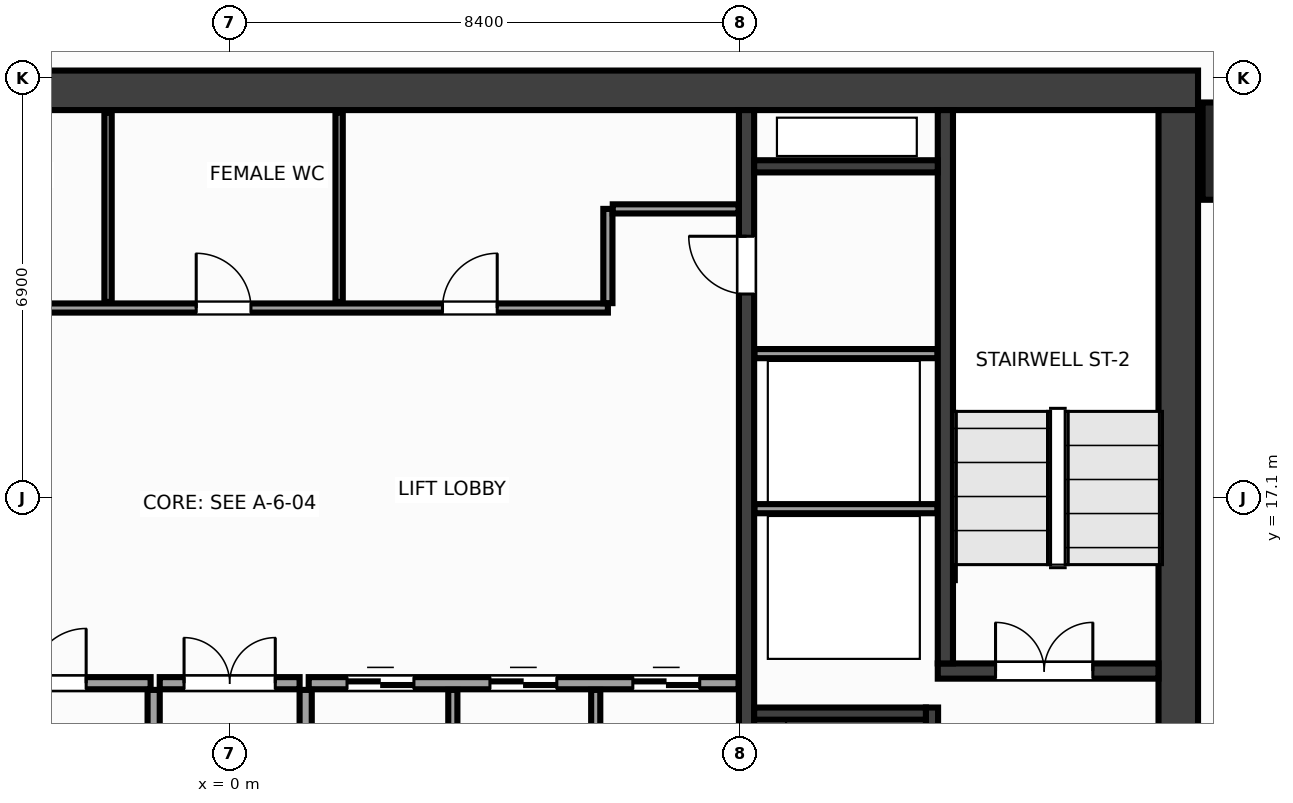
"""IFC4 building model, lengths in metres.
Left out: names, types, materials, properties, quantities, classifications, styles, units other than length and angle.
Written with IfcOpenShell. Run it as: python <this file> out.ifc"""

import sys

from ifc_helpers import new_model, si_unit, direction, frame, frame_2d, origin, origin_2d, place, context, subcontext, project, spatial, rectangle, extrude, source, transform, mapped, element, fill, save


model = new_model("IFC4")
c1 = context("Model", 3, precision=1e-05, world=origin(), true_north=direction((0.0, 1.0)))
c2 = subcontext(c1, "Body", "Model", "MODEL_VIEW")
j1 = project(units=[si_unit("LENGTHUNIT", "METRE"), si_unit("PLANEANGLEUNIT", "RADIAN")], contexts=[c1])
p1 = place(None, origin())
s1 = spatial("IfcSite", under=j1, at=p1, CompositionType="ELEMENT")
p2 = place(p1, origin())
s2 = spatial("IfcBuilding", under=s1, at=p2, CompositionType="ELEMENT")
p3 = place(p2, frame((0.0, 0.0, 113.6)))
s3 = spatial("IfcBuildingStorey", under=s2, at=p3, CompositionType="ELEMENT", Elevation=113.6)
m1 = source(origin(), c2, "Body", "SweptSolid", [
    extrude(rectangle(XDim=31.85, YDim=0.65, at=frame_2d((15.925, 0.0))), origin(), (0.0, 0.0, 1.0), 3.6),
])
p4 = place(p3, frame((-15.925, 23.8, 0.0), z_axis=(0.0, 0.0, 1.0), x_axis=(1.0, 0.0, 0.0)))
e1 = element("IfcWall", 1, at=p4, inside=s3, PredefinedType="SHEAR", context=c2, shape_type="MappedRepresentation", body=[
    mapped(m1, transform((0.0, 0.0, 0.0), x_axis=(1.0, 0.0, 0.0), y_axis=(0.0, 1.0, 0.0), z_axis=(0.0, 0.0, 1.0), scale=1.0)),
])
m2 = source(origin(), c2, "Body", "SweptSolid", [
    extrude(rectangle(XDim=12.95, YDim=0.65, at=frame_2d((6.475, 0.0))), origin(), (0.0, 0.0, 1.0), 3.6),
])
p5 = place(p3, frame((15.6, 10.525, 0.0), z_axis=(0.0, 0.0, 1.0), x_axis=(0.0, 1.0, 0.0)))
e2 = element("IfcWall", 2, at=p5, inside=s3, PredefinedType="SHEAR", context=c2, shape_type="MappedRepresentation", body=[
    mapped(m2, transform((0.0, 0.0, 0.0), x_axis=(1.0, 0.0, 0.0), y_axis=(0.0, 1.0, 0.0), z_axis=(0.0, 0.0, 1.0), scale=1.0)),
])
m3 = source(origin(), c2, "Body", "SweptSolid", [
    extrude(rectangle(XDim=12.95, YDim=0.25, at=frame_2d((6.475, 0.0))), origin(), (0.0, 0.0, 1.0), 3.6),
])
p6 = place(p3, frame((8.5, 10.525, 0.0), z_axis=(0.0, 0.0, 1.0), x_axis=(0.0, 1.0, 0.0)))
e3 = element("IfcWall", 3, at=p6, inside=s3, PredefinedType="SHEAR", context=c2, shape_type="MappedRepresentation", body=[
    mapped(m3, transform((0.0, 0.0, 0.0), x_axis=(1.0, 0.0, 0.0), y_axis=(0.0, 1.0, 0.0), z_axis=(0.0, 0.0, 1.0), scale=1.0)),
])
p7 = place(p6, frame((9.925, 0.0, 0.0)))
e4 = element("IfcOpeningElement", 4, at=p7, cuts=e3, PredefinedType="OPENING", context=c2, shape_type="SweptSolid", body=[
    extrude(rectangle(XDim=0.95, YDim=2.15, at=frame_2d((0.475, 1.075))), frame((0.0, 0.137, 0.0), z_axis=(0.0, -1.0, 0.0), x_axis=(1.0, 0.0, 0.0)), (0.0, 0.0, 1.0), 0.274),
])
m4 = source(origin(), c2, "Body", "SweptSolid", [
    extrude(rectangle(XDim=3.63, YDim=0.25, at=frame_2d((1.815, 0.0))), origin(), (0.0, 0.0, 1.0), 3.6),
])
p8 = place(p3, frame((11.645, 14.25, 0.0), z_axis=(0.0, 0.0, 1.0), x_axis=(1.0, 0.0, 0.0)))
e5 = element("IfcWall", 5, at=p8, inside=s3, PredefinedType="SHEAR", context=c2, shape_type="MappedRepresentation", body=[
    mapped(m4, transform((0.0, 0.0, 0.0), x_axis=(1.0, 0.0, 0.0), y_axis=(0.0, 1.0, 0.0), z_axis=(0.0, 0.0, 1.0), scale=1.0)),
])
p9 = place(p8, frame((0.95, 0.0, 0.0)))
e6 = element("IfcOpeningElement", 6, at=p9, cuts=e5, PredefinedType="OPENING", context=c2, shape_type="SweptSolid", body=[
    extrude(rectangle(XDim=1.6, YDim=2.15, at=frame_2d((0.8, 1.075))), frame((0.0, 0.137, 0.0), z_axis=(0.0, -1.0, 0.0), x_axis=(1.0, 0.0, 0.0)), (0.0, 0.0, 1.0), 0.274),
])
m5 = source(origin(), c2, "Body", "SweptSolid", [
    extrude(rectangle(XDim=9.1, YDim=0.25, at=frame_2d((4.55, 0.0))), origin(), (0.0, 0.0, 1.0), 3.6),
])
p10 = place(p3, frame((11.77, 14.375, 0.0), z_axis=(0.0, 0.0, 1.0), x_axis=(0.0, 1.0, 0.0)))
e7 = element("IfcWall", 7, at=p10, inside=s3, PredefinedType="SHEAR", context=c2, shape_type="MappedRepresentation", body=[
    mapped(m5, transform((0.0, 0.0, 0.0), x_axis=(1.0, 0.0, 0.0), y_axis=(0.0, 1.0, 0.0), z_axis=(0.0, 0.0, 1.0), scale=1.0)),
])
m6 = source(origin(), c2, "Body", "SweptSolid", [
    extrude(rectangle(XDim=3.125, YDim=0.2, at=frame_2d((1.562, 0.0))), origin(), (0.0, 0.0, 1.0), 3.6),
])
p11 = place(p3, frame((11.55, 10.525, 0.0), z_axis=(0.0, 0.0, 1.0), x_axis=(0.0, 1.0, 0.0)))
e8 = element("IfcWall", 8, at=p11, inside=s3, PredefinedType="SHEAR", context=c2, shape_type="MappedRepresentation", body=[
    mapped(m6, transform((0.0, 0.0, 0.0), x_axis=(1.0, 0.0, 0.0), y_axis=(0.0, 1.0, 0.0), z_axis=(0.0, 0.0, 1.0), scale=1.0)),
])
p12 = place(p11, frame((0.9, 0.0, 0.0)))
e9 = element("IfcOpeningElement", 9, at=p12, cuts=e8, PredefinedType="OPENING", context=c2, shape_type="SweptSolid", body=[
    extrude(rectangle(XDim=1.1, YDim=2.15, at=frame_2d((0.55, 1.075))), frame((0.0, 0.112, 0.0), z_axis=(0.0, -1.0, 0.0), x_axis=(1.0, 0.0, 0.0)), (0.0, 0.0, 1.0), 0.224),
])
m7 = source(origin(), c2, "Body", "SweptSolid", [
    extrude(rectangle(XDim=2.825, YDim=0.2, at=frame_2d((1.413, 0.0))), origin(), (0.0, 0.0, 1.0), 3.6),
])
p13 = place(p3, frame((8.625, 13.55, 0.0), z_axis=(0.0, 0.0, 1.0), x_axis=(1.0, 0.0, 0.0)))
e10 = element("IfcWall", 10, at=p13, inside=s3, PredefinedType="SHEAR", context=c2, shape_type="MappedRepresentation", body=[
    mapped(m7, transform((0.0, 0.0, 0.0), x_axis=(1.0, 0.0, 0.0), y_axis=(0.0, 1.0, 0.0), z_axis=(0.0, 0.0, 1.0), scale=1.0)),
])
m8 = source(origin(), c2, "Body", "SweptSolid", [
    extrude(rectangle(XDim=3.02, YDim=0.2, at=frame_2d((1.51, 0.0))), origin(), (0.0, 0.0, 1.0), 3.6),
])
p14 = place(p3, frame((8.625, 22.55, 0.0), z_axis=(0.0, 0.0, 1.0), x_axis=(1.0, 0.0, 0.0)))
e11 = element("IfcWall", 11, at=p14, inside=s3, PredefinedType="SHEAR", context=c2, shape_type="MappedRepresentation", body=[
    mapped(m8, transform((0.0, 0.0, 0.0), x_axis=(1.0, 0.0, 0.0), y_axis=(0.0, 1.0, 0.0), z_axis=(0.0, 0.0, 1.0), scale=1.0)),
])
m9 = source(origin(), c2, "Body", "SweptSolid", [
    extrude(rectangle(XDim=1.6, YDim=1.6, at=origin_2d()), origin(), (0.0, 0.0, 1.0), 3.6),
])
p15 = place(p3, frame((16.8, 22.8, 0.0), z_axis=(0.0, 0.0, 1.0), x_axis=(1.0, 0.0, 0.0)))
e12 = element("IfcColumn", 12, at=p15, inside=s3, PredefinedType="COLUMN", context=c2, shape_type="MappedRepresentation", body=[
    mapped(m9, transform((0.0, 0.0, 0.0), x_axis=(1.0, 0.0, 0.0), y_axis=(0.0, 1.0, 0.0), z_axis=(0.0, 0.0, 1.0), scale=1.0)),
])
m10 = source(origin(), c2, "Body", "SweptSolid", [
    extrude(rectangle(XDim=3.01, YDim=0.15, at=frame_2d((1.505, 0.0))), origin(), (0.0, 0.0, 1.0), 3.36),
])
for number, where, z_axis, x_axis in (
    (13, (8.63, 16.92, 0.0), (0.0, 0.0, 1.0), (1.0, 0.0, 0.0)),
    (14, (8.63, 19.47, 0.0), (0.0, 0.0, 1.0), (1.0, 0.0, 0.0)),
):
    element("IfcWall", number, at=place(p3, frame(where, z_axis=z_axis, x_axis=x_axis)), inside=s3, PredefinedType="PARTITIONING", context=c2, shape_type="MappedRepresentation", body=[
        mapped(m10, transform((0.0, 0.0, 0.0), x_axis=(1.0, 0.0, 0.0), y_axis=(0.0, 1.0, 0.0), z_axis=(0.0, 0.0, 1.0), scale=1.0)),
    ])
m11 = source(origin(), c2, "Body", "SweptSolid", [
    extrude(rectangle(XDim=7.07, YDim=0.2, at=frame_2d((3.535, 0.0))), origin(), (0.0, 0.0, 1.0), 3.36),
])
p16 = place(p3, frame((-8.37, 14.05, 0.0), z_axis=(0.0, 0.0, 1.0), x_axis=(1.0, 0.0, 0.0)))
e15 = element("IfcWall", 15, at=p16, inside=s3, PredefinedType="PARTITIONING", context=c2, shape_type="MappedRepresentation", body=[
    mapped(m11, transform((0.0, 0.0, 0.0), x_axis=(1.0, 0.0, 0.0), y_axis=(0.0, 1.0, 0.0), z_axis=(0.0, 0.0, 1.0), scale=1.0)),
])
p17 = place(p16, frame((1.66, 0.0, 0.0)))
e16 = element("IfcOpeningElement", 16, at=p17, cuts=e15, PredefinedType="OPENING", context=c2, shape_type="SweptSolid", body=[
    extrude(rectangle(XDim=0.9, YDim=2.15, at=frame_2d((0.45, 1.075))), frame((0.0, 0.112, 0.0), z_axis=(0.0, -1.0, 0.0), x_axis=(1.0, 0.0, 0.0)), (0.0, 0.0, 1.0), 0.224),
])
p18 = place(p16, frame((5.11, 0.0, 0.0)))
e17 = element("IfcOpeningElement", 17, at=p18, cuts=e15, PredefinedType="OPENING", context=c2, shape_type="SweptSolid", body=[
    extrude(rectangle(XDim=0.9, YDim=2.15, at=frame_2d((0.45, 1.075))), frame((0.0, 0.112, 0.0), z_axis=(0.0, -1.0, 0.0), x_axis=(1.0, 0.0, 0.0)), (0.0, 0.0, 1.0), 0.224),
])
p19 = place(p3, frame((1.3, 14.05, 0.0), z_axis=(0.0, 0.0, 1.0), x_axis=(1.0, 0.0, 0.0)))
e18 = element("IfcWall", 18, at=p19, inside=s3, PredefinedType="PARTITIONING", context=c2, shape_type="MappedRepresentation", body=[
    mapped(m11, transform((0.0, 0.0, 0.0), x_axis=(1.0, 0.0, 0.0), y_axis=(0.0, 1.0, 0.0), z_axis=(0.0, 0.0, 1.0), scale=1.0)),
])
p20 = place(p19, frame((0.63, 0.0, 0.0)))
e19 = element("IfcOpeningElement", 19, at=p20, cuts=e18, PredefinedType="OPENING", context=c2, shape_type="SweptSolid", body=[
    extrude(rectangle(XDim=1.1, YDim=2.15, at=frame_2d((0.55, 1.075))), frame((0.0, 0.112, 0.0), z_axis=(0.0, -1.0, 0.0), x_axis=(1.0, 0.0, 0.0)), (0.0, 0.0, 1.0), 0.224),
])
p21 = place(p19, frame((2.98, 0.0, 0.0)))
e20 = element("IfcOpeningElement", 20, at=p21, cuts=e18, PredefinedType="OPENING", context=c2, shape_type="SweptSolid", body=[
    extrude(rectangle(XDim=1.1, YDim=2.15, at=frame_2d((0.55, 1.075))), frame((0.0, 0.112, 0.0), z_axis=(0.0, -1.0, 0.0), x_axis=(1.0, 0.0, 0.0)), (0.0, 0.0, 1.0), 0.224),
])
p22 = place(p19, frame((5.33, 0.0, 0.0)))
e21 = element("IfcOpeningElement", 21, at=p22, cuts=e18, PredefinedType="OPENING", context=c2, shape_type="SweptSolid", body=[
    extrude(rectangle(XDim=1.1, YDim=2.15, at=frame_2d((0.55, 1.075))), frame((0.0, 0.112, 0.0), z_axis=(0.0, -1.0, 0.0), x_axis=(1.0, 0.0, 0.0)), (0.0, 0.0, 1.0), 0.224),
])
m12 = source(origin(), c2, "Body", "SweptSolid", [
    extrude(rectangle(XDim=3.415, YDim=0.2, at=frame_2d((1.708, 0.0))), origin(), (0.0, 0.0, 1.0), 3.36),
])
for number, where, z_axis, x_axis in (
    (22, (-1.25, 10.525, 0.0), (0.0, 0.0, 1.0), (0.0, 1.0, 0.0)),
    (23, (1.25, 10.525, 0.0), (0.0, 0.0, 1.0), (0.0, 1.0, 0.0)),
):
    element("IfcWall", number, at=place(p3, frame(where, z_axis=z_axis, x_axis=x_axis)), inside=s3, PredefinedType="PARTITIONING", context=c2, shape_type="MappedRepresentation", body=[
        mapped(m12, transform((0.0, 0.0, 0.0), x_axis=(1.0, 0.0, 0.0), y_axis=(0.0, 1.0, 0.0), z_axis=(0.0, 0.0, 1.0), scale=1.0)),
    ])
m13 = source(origin(), c2, "Body", "SweptSolid", [
    extrude(rectangle(XDim=2.3, YDim=0.2, at=frame_2d((1.15, 0.0))), origin(), (0.0, 0.0, 1.0), 3.36),
])
p23 = place(p3, frame((-1.15, 14.05, 0.0), z_axis=(0.0, 0.0, 1.0), x_axis=(1.0, 0.0, 0.0)))
e24 = element("IfcWall", 24, at=p23, inside=s3, PredefinedType="PARTITIONING", context=c2, shape_type="MappedRepresentation", body=[
    mapped(m13, transform((0.0, 0.0, 0.0), x_axis=(1.0, 0.0, 0.0), y_axis=(0.0, 1.0, 0.0), z_axis=(0.0, 0.0, 1.0), scale=1.0)),
])
p24 = place(p23, frame((0.4, 0.0, 0.0)))
e25 = element("IfcOpeningElement", 25, at=p24, cuts=e24, PredefinedType="OPENING", context=c2, shape_type="SweptSolid", body=[
    extrude(rectangle(XDim=1.5, YDim=2.2, at=frame_2d((0.75, 1.1))), frame((0.0, 0.112, 0.0), z_axis=(0.0, -1.0, 0.0), x_axis=(1.0, 0.0, 0.0)), (0.0, 0.0, 1.0), 0.224),
])
m14 = source(origin(), c2, "Body", "SweptSolid", [
    extrude(rectangle(XDim=14.59, YDim=0.15, at=frame_2d((7.295, 0.0))), origin(), (0.0, 0.0, 1.0), 3.36),
])
p25 = place(p3, frame((-8.37, 20.22, 0.0), z_axis=(0.0, 0.0, 1.0), x_axis=(1.0, 0.0, 0.0)))
e26 = element("IfcWall", 26, at=p25, inside=s3, PredefinedType="PARTITIONING", context=c2, shape_type="MappedRepresentation", body=[
    mapped(m14, transform((0.0, 0.0, 0.0), x_axis=(1.0, 0.0, 0.0), y_axis=(0.0, 1.0, 0.0), z_axis=(0.0, 0.0, 1.0), scale=1.0)),
])
p26 = place(p25, frame((1.06, 0.0, 0.0)))
e27 = element("IfcOpeningElement", 27, at=p26, cuts=e26, PredefinedType="OPENING", context=c2, shape_type="SweptSolid", body=[
    extrude(rectangle(XDim=0.9, YDim=2.15, at=frame_2d((0.45, 1.075))), frame((0.0, 0.087, 0.0), z_axis=(0.0, -1.0, 0.0), x_axis=(1.0, 0.0, 0.0)), (0.0, 0.0, 1.0), 0.174),
])
p27 = place(p25, frame((4.22, 0.0, 0.0)))
e28 = element("IfcOpeningElement", 28, at=p27, cuts=e26, PredefinedType="OPENING", context=c2, shape_type="SweptSolid", body=[
    extrude(rectangle(XDim=0.9, YDim=2.15, at=frame_2d((0.45, 1.075))), frame((0.0, 0.087, 0.0), z_axis=(0.0, -1.0, 0.0), x_axis=(1.0, 0.0, 0.0)), (0.0, 0.0, 1.0), 0.174),
])
p28 = place(p25, frame((7.82, 0.0, 0.0)))
e29 = element("IfcOpeningElement", 29, at=p28, cuts=e26, PredefinedType="OPENING", context=c2, shape_type="SweptSolid", body=[
    extrude(rectangle(XDim=0.9, YDim=2.15, at=frame_2d((0.45, 1.075))), frame((0.0, 0.087, 0.0), z_axis=(0.0, -1.0, 0.0), x_axis=(1.0, 0.0, 0.0)), (0.0, 0.0, 1.0), 0.174),
])
p29 = place(p25, frame((11.87, 0.0, 0.0)))
e30 = element("IfcOpeningElement", 30, at=p29, cuts=e26, PredefinedType="OPENING", context=c2, shape_type="SweptSolid", body=[
    extrude(rectangle(XDim=0.9, YDim=2.15, at=frame_2d((0.45, 1.075))), frame((0.0, 0.087, 0.0), z_axis=(0.0, -1.0, 0.0), x_axis=(1.0, 0.0, 0.0)), (0.0, 0.0, 1.0), 0.174),
])
m15 = source(origin(), c2, "Body", "SweptSolid", [
    extrude(rectangle(XDim=1.55, YDim=0.15, at=frame_2d((0.775, 0.0))), origin(), (0.0, 0.0, 1.0), 3.36),
])
p30 = place(p3, frame((6.22, 20.3, 0.0), z_axis=(0.0, 0.0, 1.0), x_axis=(0.0, 1.0, 0.0)))
e31 = element("IfcWall", 31, at=p30, inside=s3, PredefinedType="PARTITIONING", context=c2, shape_type="MappedRepresentation", body=[
    mapped(m15, transform((0.0, 0.0, 0.0), x_axis=(1.0, 0.0, 0.0), y_axis=(0.0, 1.0, 0.0), z_axis=(0.0, 0.0, 1.0), scale=1.0)),
])
m16 = source(origin(), c2, "Body", "SweptSolid", [
    extrude(rectangle(XDim=2.07, YDim=0.15, at=frame_2d((1.035, 0.0))), origin(), (0.0, 0.0, 1.0), 3.36),
])
p31 = place(p3, frame((6.3, 21.85, 0.0), z_axis=(0.0, 0.0, 1.0), x_axis=(1.0, 0.0, 0.0)))
e32 = element("IfcWall", 32, at=p31, inside=s3, PredefinedType="PARTITIONING", context=c2, shape_type="MappedRepresentation", body=[
    mapped(m16, transform((0.0, 0.0, 0.0), x_axis=(1.0, 0.0, 0.0), y_axis=(0.0, 1.0, 0.0), z_axis=(0.0, 0.0, 1.0), scale=1.0)),
])
m17 = source(origin(), c2, "Body", "SweptSolid", [
    extrude(rectangle(XDim=3.415, YDim=0.15, at=frame_2d((1.708, 0.0))), origin(), (0.0, 0.0, 1.0), 3.36),
])
for number, where, z_axis, x_axis in (
    (33, (3.67, 10.525, 0.0), (0.0, 0.0, 1.0), (0.0, 1.0, 0.0)),
    (34, (6.02, 10.525, 0.0), (0.0, 0.0, 1.0), (0.0, 1.0, 0.0)),
):
    element("IfcWall", number, at=place(p3, frame(where, z_axis=z_axis, x_axis=x_axis)), inside=s3, PredefinedType="PARTITIONING", context=c2, shape_type="MappedRepresentation", body=[
        mapped(m17, transform((0.0, 0.0, 0.0), x_axis=(1.0, 0.0, 0.0), y_axis=(0.0, 1.0, 0.0), z_axis=(0.0, 0.0, 1.0), scale=1.0)),
    ])
m18 = source(origin(), c2, "Body", "SweptSolid", [
    extrude(rectangle(XDim=3.115, YDim=0.12, at=frame_2d((1.558, 0.0))), origin(), (0.0, 0.0, 1.0), 3.36),
])
for number, where, z_axis, x_axis in (
    (35, (-2.0, 20.32, 0.0), (0.0, 0.0, 1.0), (0.0, 1.0, 0.0)),
    (36, (1.8, 20.32, 0.0), (0.0, 0.0, 1.0), (0.0, 1.0, 0.0)),
):
    element("IfcWall", number, at=place(p3, frame(where, z_axis=z_axis, x_axis=x_axis)), inside=s3, PredefinedType="PARTITIONING", context=c2, shape_type="MappedRepresentation", body=[
        mapped(m18, transform((0.0, 0.0, 0.0), x_axis=(1.0, 0.0, 0.0), y_axis=(0.0, 1.0, 0.0), z_axis=(0.0, 0.0, 1.0), scale=1.0)),
    ])
m19 = source(origin(), c2, "Body", "SweptSolid", [
    extrude(rectangle(XDim=1.6, YDim=2.15, at=frame_2d((0.8, 1.075))), frame((0.0, 0.025, 0.0), z_axis=(0.0, -1.0, 0.0), x_axis=(1.0, 0.0, 0.0)), (0.0, 0.0, 1.0), 0.05),
])
p32 = place(p9, origin())
e37 = element("IfcDoor", 37, at=p32, inside=s3, OperationType="DOUBLE_DOOR_SINGLE_SWING", PredefinedType="DOOR", context=c2, shape_type="MappedRepresentation", body=[
    mapped(m19, transform((0.0, 0.0, 0.0), x_axis=(1.0, 0.0, 0.0), y_axis=(0.0, 1.0, 0.0), z_axis=(0.0, 0.0, 1.0), scale=1.0)),
])
fill(e6, e37)
m20 = source(origin(), c2, "Body", "SweptSolid", [
    extrude(rectangle(XDim=0.95, YDim=2.15, at=frame_2d((0.475, 1.075))), frame((0.0, 0.025, 0.0), z_axis=(0.0, -1.0, 0.0), x_axis=(1.0, 0.0, 0.0)), (0.0, 0.0, 1.0), 0.05),
])
p33 = place(p7, origin())
e38 = element("IfcDoor", 38, at=p33, inside=s3, OperationType="SINGLE_SWING_RIGHT", PredefinedType="DOOR", context=c2, shape_type="MappedRepresentation", body=[
    mapped(m20, transform((0.0, 0.0, 0.0), x_axis=(1.0, 0.0, 0.0), y_axis=(0.0, 1.0, 0.0), z_axis=(0.0, 0.0, 1.0), scale=1.0)),
])
fill(e4, e38)
m21 = source(origin(), c2, "Body", "SweptSolid", [
    extrude(rectangle(XDim=0.9, YDim=2.15, at=frame_2d((0.45, 1.075))), frame((0.0, 0.025, 0.0), z_axis=(0.0, -1.0, 0.0), x_axis=(1.0, 0.0, 0.0)), (0.0, 0.0, 1.0), 0.05),
])
p34 = place(p18, origin())
e39 = element("IfcDoor", 39, at=p34, inside=s3, OperationType="SINGLE_SWING_RIGHT", PredefinedType="DOOR", context=c2, shape_type="MappedRepresentation", body=[
    mapped(m21, transform((0.0, 0.0, 0.0), x_axis=(1.0, 0.0, 0.0), y_axis=(0.0, 1.0, 0.0), z_axis=(0.0, 0.0, 1.0), scale=1.0)),
])
fill(e17, e39)
m22 = source(origin(), c2, "Body", "SweptSolid", [
    extrude(rectangle(XDim=1.1, YDim=2.15, at=frame_2d((0.55, 1.075))), frame((0.0, 0.025, 0.0), z_axis=(0.0, -1.0, 0.0), x_axis=(1.0, 0.0, 0.0)), (0.0, 0.0, 1.0), 0.05),
])
p35 = place(p20, origin())
e40 = element("IfcDoor", 40, at=p35, inside=s3, OperationType="DOUBLE_DOOR_SLIDING", PredefinedType="DOOR", context=c2, shape_type="MappedRepresentation", body=[
    mapped(m22, transform((0.0, 0.0, 0.0), x_axis=(1.0, 0.0, 0.0), y_axis=(0.0, 1.0, 0.0), z_axis=(0.0, 0.0, 1.0), scale=1.0)),
])
fill(e19, e40)
p36 = place(p21, origin())
e41 = element("IfcDoor", 41, at=p36, inside=s3, OperationType="DOUBLE_DOOR_SLIDING", PredefinedType="DOOR", context=c2, shape_type="MappedRepresentation", body=[
    mapped(m22, transform((0.0, 0.0, 0.0), x_axis=(1.0, 0.0, 0.0), y_axis=(0.0, 1.0, 0.0), z_axis=(0.0, 0.0, 1.0), scale=1.0)),
])
fill(e20, e41)
p37 = place(p22, origin())
e42 = element("IfcDoor", 42, at=p37, inside=s3, OperationType="DOUBLE_DOOR_SLIDING", PredefinedType="DOOR", context=c2, shape_type="MappedRepresentation", body=[
    mapped(m22, transform((0.0, 0.0, 0.0), x_axis=(1.0, 0.0, 0.0), y_axis=(0.0, 1.0, 0.0), z_axis=(0.0, 0.0, 1.0), scale=1.0)),
])
fill(e21, e42)
m23 = source(origin(), c2, "Body", "SweptSolid", [
    extrude(rectangle(XDim=1.5, YDim=2.2, at=frame_2d((0.75, 1.1))), frame((0.0, 0.025, 0.0), z_axis=(0.0, -1.0, 0.0), x_axis=(1.0, 0.0, 0.0)), (0.0, 0.0, 1.0), 0.05),
])
p38 = place(p24, origin())
e43 = element("IfcDoor", 43, at=p38, inside=s3, OperationType="DOUBLE_DOOR_SINGLE_SWING", PredefinedType="DOOR", context=c2, shape_type="MappedRepresentation", body=[
    mapped(m23, transform((0.0, 0.0, 0.0), x_axis=(1.0, 0.0, 0.0), y_axis=(0.0, 1.0, 0.0), z_axis=(0.0, 0.0, 1.0), scale=1.0)),
])
fill(e25, e43)
p39 = place(p28, origin())
e44 = element("IfcDoor", 44, at=p39, inside=s3, OperationType="SINGLE_SWING_LEFT", PredefinedType="DOOR", context=c2, shape_type="MappedRepresentation", body=[
    mapped(m21, transform((0.0, 0.0, 0.0), x_axis=(1.0, 0.0, 0.0), y_axis=(0.0, 1.0, 0.0), z_axis=(0.0, 0.0, 1.0), scale=1.0)),
])
fill(e29, e44)
p40 = place(p29, origin())
e45 = element("IfcDoor", 45, at=p40, inside=s3, OperationType="SINGLE_SWING_RIGHT", PredefinedType="DOOR", context=c2, shape_type="MappedRepresentation", body=[
    mapped(m21, transform((0.0, 0.0, 0.0), x_axis=(1.0, 0.0, 0.0), y_axis=(0.0, 1.0, 0.0), z_axis=(0.0, 0.0, 1.0), scale=1.0)),
])
fill(e30, e45)
save(model, sys.argv[1])
